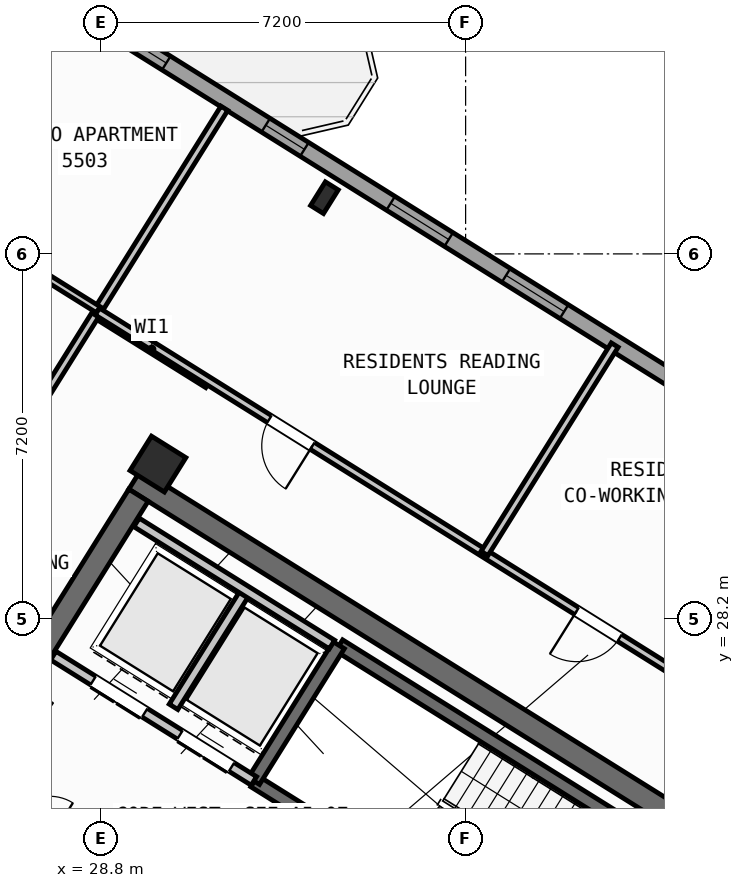
"""IFC4 building model, lengths in metres.
Left out: names, types, materials, properties, quantities, classifications, styles, units other than length and angle.
Written with IfcOpenShell. Run it as: python <this file> out.ifc"""

import sys

from ifc_helpers import new_model, si_unit, direction, frame, frame_2d, origin, origin_2d, place, context, subcontext, project, spatial, rectangle, hollow_rectangle, i_section, extrude, source, transform, mapped, element, fill, save


model = new_model("IFC4")
c1 = context("Model", 3, precision=1e-05, world=origin(), true_north=direction((0.0, 1.0)))
c2 = subcontext(c1, "Body", "Model", "MODEL_VIEW")
j1 = project(units=[si_unit("LENGTHUNIT", "METRE"), si_unit("PLANEANGLEUNIT", "RADIAN")], contexts=[c1])
p1 = place(None, origin())
s1 = spatial("IfcSite", under=j1, at=p1, CompositionType="ELEMENT")
p2 = place(p1, origin())
s2 = spatial("IfcBuilding", under=s1, at=p2, CompositionType="ELEMENT")
p3 = place(p2, frame((0.0, 0.0, 218.4)))
s3 = spatial("IfcBuildingStorey", under=s2, at=p3, CompositionType="ELEMENT", Elevation=218.4)
p4 = place(p3, frame((40.531, 24.036, 0.0), z_axis=(0.0, 0.0, 1.0), x_axis=(-0.848048787466, 0.529918157905, 0.0)))
e1 = element("IfcWall", 1, at=p4, inside=s3, PredefinedType="SHEAR", context=c2, shape_type="SweptSolid", body=[
    extrude(rectangle(XDim=13.04, YDim=0.45, at=frame_2d((6.52, 0.0))), origin(), (0.0, 0.0, 1.0), 3.35),
])
p5 = place(p3, frame((29.544, 30.636, 0.0), z_axis=(0.0, 0.0, 1.0), x_axis=(-0.529902075036, -0.848058836916, 0.0)))
e2 = element("IfcWall", 2, at=p5, inside=s3, PredefinedType="SHEAR", context=c2, shape_type="SweptSolid", body=[
    extrude(rectangle(XDim=3.625, YDim=0.45, at=frame_2d((1.812, 0.0))), origin(), (0.0, 0.0, 1.0), 3.35),
])
m1 = source(origin(), c2, "Body", "SweptSolid", [
    extrude(i_section(OverallWidth=0.3, OverallDepth=0.55, WebThickness=0.015, FlangeThickness=0.029, at=origin_2d()), origin(), (0.0, 0.0, 1.0), 3.6),
])
p6 = place(p3, frame((33.213, 36.509, 0.0), z_axis=(0.0, 0.0, 1.0), x_axis=(-0.848048096156, 0.529919264233, 0.0)))
e3 = element("IfcColumn", 3, at=p6, inside=s3, PredefinedType="COLUMN", context=c2, shape_type="MappedRepresentation", body=[
    mapped(m1, transform((0.0, 0.0, 0.0), scale=1.0)),
])
m2 = source(origin(), c2, "Body", "SweptSolid", [
    extrude(hollow_rectangle(XDim=0.8, YDim=0.8, WallThickness=0.032, at=origin_2d()), origin(), (0.0, 0.0, 1.0), 3.6),
])
p7 = place(p3, frame((29.928, 31.251, 0.0), z_axis=(0.0, 0.0, 1.0), x_axis=(-0.848048096156, 0.529919264233, 0.0)))
e4 = element("IfcColumn", 4, at=p7, inside=s3, PredefinedType="COLUMN", context=c2, shape_type="MappedRepresentation", body=[
    mapped(m2, transform((0.0, 0.0, 0.0), scale=1.0)),
])
p8 = place(p3, frame((31.76, 12.183, 0.0), z_axis=(0.0, 0.0, 1.0), x_axis=(-0.848047074256, 0.529920899612, 0.0)))
e5 = element("IfcWall", 5, at=p8, inside=s3, PredefinedType="STANDARD", context=c2, shape_type="SweptSolid", body=[
    extrude(rectangle(XDim=30.652, YDim=0.32, at=frame_2d((15.326, 0.0))), origin(), (0.0, 0.0, 1.0), 3.35),
])
p9 = place(p8, frame((15.166, 0.0, 0.0)))
e6 = element("IfcOpeningElement", 6, at=p9, cuts=e5, PredefinedType="OPENING", context=c2, shape_type="SweptSolid", body=[
    extrude(rectangle(XDim=1.2, YDim=2.15, at=frame_2d((0.6, 1.075))), frame((0.0, 0.17, 0.0), z_axis=(0.0, -1.0, 0.0), x_axis=(1.0, 0.0, 0.0)), (0.0, 0.0, 1.0), 0.34),
])
p10 = place(p8, frame((2.24, 0.0, 0.9)))
e7 = element("IfcOpeningElement", 7, at=p10, cuts=e5, PredefinedType="OPENING", context=c2, shape_type="SweptSolid", body=[
    extrude(rectangle(XDim=1.65, YDim=1.45, at=frame_2d((0.825, 0.725))), frame((0.0, 0.17, 0.0), z_axis=(0.0, -1.0, 0.0), x_axis=(1.0, 0.0, 0.0)), (0.0, 0.0, 1.0), 0.34),
])
p11 = place(p8, frame((7.469, 0.0, 0.9)))
e8 = element("IfcOpeningElement", 8, at=p11, cuts=e5, PredefinedType="OPENING", context=c2, shape_type="SweptSolid", body=[
    extrude(rectangle(XDim=1.65, YDim=1.45, at=frame_2d((0.825, 0.725))), frame((0.0, 0.17, 0.0), z_axis=(0.0, -1.0, 0.0), x_axis=(1.0, 0.0, 0.0)), (0.0, 0.0, 1.0), 0.34),
])
p12 = place(p8, frame((12.623, 0.0, 1.0)))
e9 = element("IfcOpeningElement", 9, at=p12, cuts=e5, PredefinedType="OPENING", context=c2, shape_type="SweptSolid", body=[
    extrude(rectangle(XDim=0.9, YDim=1.25, at=frame_2d((0.45, 0.625))), frame((0.0, 0.17, 0.0), z_axis=(0.0, -1.0, 0.0), x_axis=(1.0, 0.0, 0.0)), (0.0, 0.0, 1.0), 0.34),
])
p13 = place(p8, frame((19.583, 0.0, 1.0)))
e10 = element("IfcOpeningElement", 10, at=p13, cuts=e5, PredefinedType="OPENING", context=c2, shape_type="SweptSolid", body=[
    extrude(rectangle(XDim=0.9, YDim=1.25, at=frame_2d((0.45, 0.625))), frame((0.0, 0.17, 0.0), z_axis=(0.0, -1.0, 0.0), x_axis=(1.0, 0.0, 0.0)), (0.0, 0.0, 1.0), 0.34),
])
p14 = place(p8, frame((22.033, 0.0, 1.0)))
e11 = element("IfcOpeningElement", 11, at=p14, cuts=e5, PredefinedType="OPENING", context=c2, shape_type="SweptSolid", body=[
    extrude(rectangle(XDim=0.9, YDim=1.25, at=frame_2d((0.45, 0.625))), frame((0.0, 0.17, 0.0), z_axis=(0.0, -1.0, 0.0), x_axis=(1.0, 0.0, 0.0)), (0.0, 0.0, 1.0), 0.34),
])
p15 = place(p8, frame((27.666, 0.0, 0.9)))
e12 = element("IfcOpeningElement", 12, at=p15, cuts=e5, PredefinedType="OPENING", context=c2, shape_type="SweptSolid", body=[
    extrude(rectangle(XDim=1.35, YDim=1.45, at=frame_2d((0.675, 0.725))), frame((0.0, 0.17, 0.0), z_axis=(0.0, -1.0, 0.0), x_axis=(1.0, 0.0, 0.0)), (0.0, 0.0, 1.0), 0.34),
])
p16 = place(p3, frame((17.424, 47.083, 0.0), z_axis=(0.0, 0.0, 1.0), x_axis=(0.848049927979, -0.529916332693, 0.0)))
e13 = element("IfcWall", 13, at=p16, inside=s3, PredefinedType="STANDARD", context=c2, shape_type="SweptSolid", body=[
    extrude(rectangle(XDim=29.223, YDim=0.32, at=frame_2d((14.612, 0.0))), origin(), (0.0, 0.0, 1.0), 3.35),
])
p17 = place(p16, frame((3.77, 0.0, 0.0)))
e14 = element("IfcOpeningElement", 14, at=p17, cuts=e13, PredefinedType="OPENING", context=c2, shape_type="SweptSolid", body=[
    extrude(rectangle(XDim=1.05, YDim=2.15, at=frame_2d((0.525, 1.075))), frame((0.0, 0.17, 0.0), z_axis=(0.0, -1.0, 0.0), x_axis=(1.0, 0.0, 0.0)), (0.0, 0.0, 1.0), 0.34),
])
p18 = place(p16, frame((1.125, 0.0, 0.9)))
e15 = element("IfcOpeningElement", 15, at=p18, cuts=e13, PredefinedType="OPENING", context=c2, shape_type="SweptSolid", body=[
    extrude(rectangle(XDim=1.65, YDim=1.45, at=frame_2d((0.825, 0.725))), frame((0.0, 0.17, 0.0), z_axis=(0.0, -1.0, 0.0), x_axis=(1.0, 0.0, 0.0)), (0.0, 0.0, 1.0), 0.34),
])
p19 = place(p16, frame((7.384, 0.0, 0.9)))
e16 = element("IfcOpeningElement", 16, at=p19, cuts=e13, PredefinedType="OPENING", context=c2, shape_type="SweptSolid", body=[
    extrude(rectangle(XDim=1.35, YDim=1.45, at=frame_2d((0.675, 0.725))), frame((0.0, 0.17, 0.0), z_axis=(0.0, -1.0, 0.0), x_axis=(1.0, 0.0, 0.0)), (0.0, 0.0, 1.0), 0.34),
])
p20 = place(p16, frame((10.054, 0.0, 0.9)))
e17 = element("IfcOpeningElement", 17, at=p20, cuts=e13, PredefinedType="OPENING", context=c2, shape_type="SweptSolid", body=[
    extrude(rectangle(XDim=1.35, YDim=1.45, at=frame_2d((0.675, 0.725))), frame((0.0, 0.17, 0.0), z_axis=(0.0, -1.0, 0.0), x_axis=(1.0, 0.0, 0.0)), (0.0, 0.0, 1.0), 0.34),
])
p21 = place(p16, frame((14.039, 0.0, 1.0)))
e18 = element("IfcOpeningElement", 18, at=p21, cuts=e13, PredefinedType="OPENING", context=c2, shape_type="SweptSolid", body=[
    extrude(rectangle(XDim=0.9, YDim=1.25, at=frame_2d((0.45, 0.625))), frame((0.0, 0.17, 0.0), z_axis=(0.0, -1.0, 0.0), x_axis=(1.0, 0.0, 0.0)), (0.0, 0.0, 1.0), 0.34),
])
p22 = place(p16, frame((17.254, 0.0, 1.0)))
e19 = element("IfcOpeningElement", 19, at=p22, cuts=e13, PredefinedType="OPENING", context=c2, shape_type="SweptSolid", body=[
    extrude(rectangle(XDim=0.9, YDim=1.25, at=frame_2d((0.45, 0.625))), frame((0.0, 0.17, 0.0), z_axis=(0.0, -1.0, 0.0), x_axis=(1.0, 0.0, 0.0)), (0.0, 0.0, 1.0), 0.34),
])
p23 = place(p16, frame((20.161, 0.0, 0.9)))
e20 = element("IfcOpeningElement", 20, at=p23, cuts=e13, PredefinedType="OPENING", context=c2, shape_type="SweptSolid", body=[
    extrude(rectangle(XDim=1.35, YDim=1.45, at=frame_2d((0.675, 0.725))), frame((0.0, 0.17, 0.0), z_axis=(0.0, -1.0, 0.0), x_axis=(1.0, 0.0, 0.0)), (0.0, 0.0, 1.0), 0.34),
])
p24 = place(p16, frame((22.846, 0.0, 0.9)))
e21 = element("IfcOpeningElement", 21, at=p24, cuts=e13, PredefinedType="OPENING", context=c2, shape_type="SweptSolid", body=[
    extrude(rectangle(XDim=1.35, YDim=1.45, at=frame_2d((0.675, 0.725))), frame((0.0, 0.17, 0.0), z_axis=(0.0, -1.0, 0.0), x_axis=(1.0, 0.0, 0.0)), (0.0, 0.0, 1.0), 0.34),
])
p25 = place(p16, frame((26.898, 0.0, 1.0)))
e22 = element("IfcOpeningElement", 22, at=p25, cuts=e13, PredefinedType="OPENING", context=c2, shape_type="SweptSolid", body=[
    extrude(rectangle(XDim=0.9, YDim=1.25, at=frame_2d((0.45, 0.625))), frame((0.0, 0.17, 0.0), z_axis=(0.0, -1.0, 0.0), x_axis=(1.0, 0.0, 0.0)), (0.0, 0.0, 1.0), 0.34),
])
p26 = place(p3, frame((39.721, 23.788, 0.0), z_axis=(0.0, 0.0, 1.0), x_axis=(-0.848054434086, 0.529909121291, 0.0)))
e23 = element("IfcWall", 23, at=p26, inside=s3, PredefinedType="SHEAR", context=c2, shape_type="SweptSolid", body=[
    extrude(rectangle(XDim=7.33, YDim=0.26, at=frame_2d((3.665, 0.0))), origin(), (0.0, 0.0, 1.0), 3.35),
])
p27 = place(p3, frame((38.046, 21.108, 0.0), z_axis=(0.0, 0.0, 1.0), x_axis=(-0.848054434086, 0.529909121291, 0.0)))
e24 = element("IfcWall", 24, at=p27, inside=s3, PredefinedType="SHEAR", context=c2, shape_type="SweptSolid", body=[
    extrude(rectangle(XDim=7.33, YDim=0.26, at=frame_2d((3.665, 0.0))), origin(), (0.0, 0.0, 1.0), 3.35),
])
p28 = place(p27, frame((0.22, 0.0, 0.0)))
e25 = element("IfcOpeningElement", 25, at=p28, cuts=e24, PredefinedType="OPENING", context=c2, shape_type="SweptSolid", body=[
    extrude(rectangle(XDim=1.1, YDim=2.1, at=frame_2d((0.55, 1.05))), frame((0.0, 0.14, 0.0), z_axis=(0.0, -1.0, 0.0), x_axis=(1.0, 0.0, 0.0)), (0.0, 0.0, 1.0), 0.28),
])
p29 = place(p3, frame((33.496, 27.677, 0.0), z_axis=(0.0, 0.0, 1.0), x_axis=(-0.529908658664, -0.84805472316, 0.0)))
e26 = element("IfcWall", 26, at=p29, inside=s3, PredefinedType="SHEAR", context=c2, shape_type="SweptSolid", body=[
    extrude(rectangle(XDim=3.16, YDim=0.26, at=frame_2d((1.58, 0.0))), origin(), (0.0, 0.0, 1.0), 3.35),
])
p30 = place(p3, frame((31.822, 24.998, 0.0), z_axis=(0.0, 0.0, 1.0), x_axis=(-0.848054125777, 0.529909614701, 0.0)))
e27 = element("IfcWall", 27, at=p30, inside=s3, PredefinedType="STANDARD", context=c2, shape_type="SweptSolid", body=[
    extrude(rectangle(XDim=4.668, YDim=0.2, at=frame_2d((2.334, 0.0))), origin(), (0.0, 0.0, 1.0), 3.34),
])
p31 = place(p30, frame((0.52, 0.0, 0.0)))
e28 = element("IfcOpeningElement", 28, at=p31, cuts=e27, PredefinedType="OPENING", context=c2, shape_type="SweptSolid", body=[
    extrude(rectangle(XDim=1.2, YDim=2.15, at=frame_2d((0.6, 1.075))), frame((0.0, 0.11, 0.0), z_axis=(0.0, -1.0, 0.0), x_axis=(1.0, 0.0, 0.0)), (0.0, 0.0, 1.0), 0.22),
])
p32 = place(p30, frame((2.54, 0.0, 0.0)))
e29 = element("IfcOpeningElement", 29, at=p32, cuts=e27, PredefinedType="OPENING", context=c2, shape_type="SweptSolid", body=[
    extrude(rectangle(XDim=1.2, YDim=2.15, at=frame_2d((0.6, 1.075))), frame((0.0, 0.11, 0.0), z_axis=(0.0, -1.0, 0.0), x_axis=(1.0, 0.0, 0.0)), (0.0, 0.0, 1.0), 0.22),
])
p33 = place(p3, frame((31.645, 28.716, 0.0), z_axis=(0.0, 0.0, 1.0), x_axis=(-0.52986693015, -0.848080795876, 0.0)))
e30 = element("IfcWall", 30, at=p33, inside=s3, PredefinedType="STANDARD", context=c2, shape_type="SweptSolid", body=[
    extrude(rectangle(XDim=2.66, YDim=0.2, at=frame_2d((1.33, 0.0))), origin(), (0.0, 0.0, 1.0), 3.34),
])
p34 = place(p3, frame((33.363, 27.69, 0.0), z_axis=(0.0, 0.0, 1.0), x_axis=(-0.84804957148, 0.529916903215, 0.0)))
e31 = element("IfcWall", 31, at=p34, inside=s3, PredefinedType="STANDARD", context=c2, shape_type="SweptSolid", body=[
    extrude(rectangle(XDim=4.548, YDim=0.2, at=frame_2d((2.274, 0.0))), origin(), (0.0, 0.0, 1.0), 3.34),
])
p35 = place(p3, frame((31.525, 21.504, 0.0), z_axis=(0.0, 0.0, 1.0), x_axis=(-0.848042066329, 0.529928913853, 0.0)))
e32 = element("IfcWall", 32, at=p35, inside=s3, PredefinedType="STANDARD", context=c2, shape_type="SweptSolid", body=[
    extrude(rectangle(XDim=6.268, YDim=0.2, at=frame_2d((3.134, 0.0))), origin(), (0.0, 0.0, 1.0), 3.34),
])
p36 = place(p35, frame((4.4, 0.0, 0.0)))
e33 = element("IfcOpeningElement", 33, at=p36, cuts=e32, PredefinedType="OPENING", context=c2, shape_type="SweptSolid", body=[
    extrude(rectangle(XDim=0.86, YDim=2.05, at=frame_2d((0.43, 1.025))), frame((0.0, 0.11, 0.0), z_axis=(0.0, -1.0, 0.0), x_axis=(1.0, 0.0, 0.0)), (0.0, 0.0, 1.0), 0.22),
])
p37 = place(p35, frame((0.35, 0.0, 0.0)))
e34 = element("IfcOpeningElement", 34, at=p37, cuts=e32, PredefinedType="OPENING", context=c2, shape_type="SweptSolid", body=[
    extrude(rectangle(XDim=0.86, YDim=2.05, at=frame_2d((0.43, 1.025))), frame((0.0, 0.11, 0.0), z_axis=(0.0, -1.0, 0.0), x_axis=(1.0, 0.0, 0.0)), (0.0, 0.0, 1.0), 0.22),
])
p38 = place(p3, frame((30.914, 32.829, 0.0), z_axis=(0.0, 0.0, 1.0), x_axis=(-0.848008813643, 0.529982124211, 0.0)))
e35 = element("IfcWall", 35, at=p38, inside=s3, PredefinedType="PARTITIONING", context=c2, shape_type="SweptSolid", body=[
    extrude(rectangle(XDim=2.61, YDim=0.16, at=frame_2d((1.305, 0.0))), origin(), (0.0, 0.0, 1.0), 3.34),
])
p39 = place(p3, frame((31.239, 38.274, 0.0), z_axis=(0.0, 0.0, 1.0), x_axis=(-0.529920220799, -0.848047498427, 0.0)))
e36 = element("IfcWall", 36, at=p39, inside=s3, PredefinedType="PARTITIONING", context=c2, shape_type="SweptSolid", body=[
    extrude(rectangle(XDim=9.2, YDim=0.16, at=frame_2d((4.6, 0.0))), origin(), (0.0, 0.0, 1.0), 3.34),
])
p40 = place(p3, frame((28.753, 34.297, 0.0), z_axis=(0.0, 0.0, 1.0), x_axis=(-0.848059820872, 0.529900500304, 0.0)))
e37 = element("IfcWall", 37, at=p40, inside=s3, PredefinedType="PLUMBINGWALL", context=c2, shape_type="SweptSolid", body=[
    extrude(rectangle(XDim=3.79, YDim=0.14, at=frame_2d((1.895, 0.0))), origin(), (0.0, 0.0, 1.0), 3.34),
])
p41 = place(p40, frame((2.23, 0.0, 0.0)))
e38 = element("IfcOpeningElement", 38, at=p41, cuts=e37, PredefinedType="OPENING", context=c2, shape_type="SweptSolid", body=[
    extrude(rectangle(XDim=0.92, YDim=2.08, at=frame_2d((0.46, 1.04))), frame((0.0, 0.08, 0.0), z_axis=(0.0, -1.0, 0.0), x_axis=(1.0, 0.0, 0.0)), (0.0, 0.0, 1.0), 0.16),
])
p42 = place(p3, frame((41.936, 26.012, 0.0), z_axis=(0.0, 0.0, 1.0), x_axis=(-0.848051154596, 0.529914369676, 0.0)))
e39 = element("IfcWall", 39, at=p42, inside=s3, PredefinedType="PARTITIONING", context=c2, shape_type="SweptSolid", body=[
    extrude(rectangle(XDim=15.57, YDim=0.16, at=frame_2d((7.785, 0.0))), origin(), (0.0, 0.0, 1.0), 3.34),
])
p43 = place(p42, frame((3.415, 0.0, 0.0)))
e40 = element("IfcOpeningElement", 40, at=p43, cuts=e39, PredefinedType="OPENING", context=c2, shape_type="SweptSolid", body=[
    extrude(rectangle(XDim=1.0, YDim=2.1, at=frame_2d((0.5, 1.05))), frame((0.0, 0.09, 0.0), z_axis=(0.0, -1.0, 0.0), x_axis=(1.0, 0.0, 0.0)), (0.0, 0.0, 1.0), 0.18),
])
p44 = place(p42, frame((10.565, 0.0, 0.0)))
e41 = element("IfcOpeningElement", 41, at=p44, cuts=e39, PredefinedType="OPENING", context=c2, shape_type="SweptSolid", body=[
    extrude(rectangle(XDim=1.0, YDim=2.1, at=frame_2d((0.5, 1.05))), frame((0.0, 0.09, 0.0), z_axis=(0.0, -1.0, 0.0), x_axis=(1.0, 0.0, 0.0)), (0.0, 0.0, 1.0), 0.18),
])
p45 = place(p3, frame((38.943, 33.601, 0.0), z_axis=(0.0, 0.0, 1.0), x_axis=(-0.529949167559, -0.848029409752, 0.0)))
e42 = element("IfcWall", 42, at=p45, inside=s3, PredefinedType="PARTITIONING", context=c2, shape_type="SweptSolid", body=[
    extrude(rectangle(XDim=4.85, YDim=0.16, at=frame_2d((2.425, 0.0))), origin(), (0.0, 0.0, 1.0), 3.34),
])
m3 = source(origin(), c2, "Body", "SweptSolid", [
    extrude(rectangle(XDim=0.9, YDim=1.25, at=frame_2d((0.45, 0.625))), frame((0.0, 0.03, 0.0), z_axis=(0.0, -1.0, 0.0), x_axis=(1.0, 0.0, 0.0)), (0.0, 0.0, 1.0), 0.06),
])
p46 = place(p21, origin())
e43 = element("IfcWindow", 43, at=p46, inside=s3, PartitioningType="SINGLE_PANEL", PredefinedType="WINDOW", context=c2, shape_type="MappedRepresentation", body=[
    mapped(m3, transform((0.0, 0.0, 0.0), scale=1.0)),
])
fill(e18, e43)
p47 = place(p22, origin())
e44 = element("IfcWindow", 44, at=p47, inside=s3, PartitioningType="SINGLE_PANEL", PredefinedType="WINDOW", context=c2, shape_type="MappedRepresentation", body=[
    mapped(m3, transform((0.0, 0.0, 0.0), scale=1.0)),
])
fill(e19, e44)
m4 = source(origin(), c2, "Body", "SweptSolid", [
    extrude(rectangle(XDim=1.35, YDim=1.45, at=frame_2d((0.675, 0.725))), frame((0.0, 0.03, 0.0), z_axis=(0.0, -1.0, 0.0), x_axis=(1.0, 0.0, 0.0)), (0.0, 0.0, 1.0), 0.06),
])
p48 = place(p23, origin())
e45 = element("IfcWindow", 45, at=p48, inside=s3, PartitioningType="SINGLE_PANEL", PredefinedType="WINDOW", context=c2, shape_type="MappedRepresentation", body=[
    mapped(m4, transform((0.0, 0.0, 0.0), scale=1.0)),
])
fill(e20, e45)
p49 = place(p24, origin())
e46 = element("IfcWindow", 46, at=p49, inside=s3, PartitioningType="SINGLE_PANEL", PredefinedType="WINDOW", context=c2, shape_type="MappedRepresentation", body=[
    mapped(m4, transform((0.0, 0.0, 0.0), scale=1.0)),
])
fill(e21, e46)
m5 = source(origin(), c2, "Body", "SweptSolid", [
    extrude(rectangle(XDim=1.2, YDim=2.15, at=frame_2d((0.6, 1.075))), frame((0.0, 0.025, 0.0), z_axis=(0.0, -1.0, 0.0), x_axis=(1.0, 0.0, 0.0)), (0.0, 0.0, 1.0), 0.05),
])
p50 = place(p31, origin())
e47 = element("IfcDoor", 47, at=p50, inside=s3, OperationType="DOUBLE_DOOR_SLIDING", PredefinedType="DOOR", context=c2, shape_type="MappedRepresentation", body=[
    mapped(m5, transform((0.0, 0.0, 0.0), scale=1.0)),
])
fill(e28, e47)
p51 = place(p32, origin())
e48 = element("IfcDoor", 48, at=p51, inside=s3, OperationType="DOUBLE_DOOR_SLIDING", PredefinedType="DOOR", context=c2, shape_type="MappedRepresentation", body=[
    mapped(m5, transform((0.0, 0.0, 0.0), scale=1.0)),
])
fill(e29, e48)
m6 = source(origin(), c2, "Body", "SweptSolid", [
    extrude(rectangle(XDim=1.0, YDim=2.1, at=frame_2d((0.5, 1.05))), frame((0.0, 0.025, 0.0), z_axis=(0.0, -1.0, 0.0), x_axis=(1.0, 0.0, 0.0)), (0.0, 0.0, 1.0), 0.05),
])
p52 = place(p43, origin())
e49 = element("IfcDoor", 49, at=p52, inside=s3, OperationType="SINGLE_SWING_RIGHT", PredefinedType="DOOR", context=c2, shape_type="MappedRepresentation", body=[
    mapped(m6, transform((0.0, 0.0, 0.0), scale=1.0)),
])
fill(e40, e49)
p53 = place(p44, origin())
e50 = element("IfcDoor", 50, at=p53, inside=s3, OperationType="SINGLE_SWING_LEFT", PredefinedType="DOOR", context=c2, shape_type="MappedRepresentation", body=[
    mapped(m6, transform((0.0, 0.0, 0.0), scale=1.0)),
])
fill(e41, e50)
save(model, sys.argv[1])
